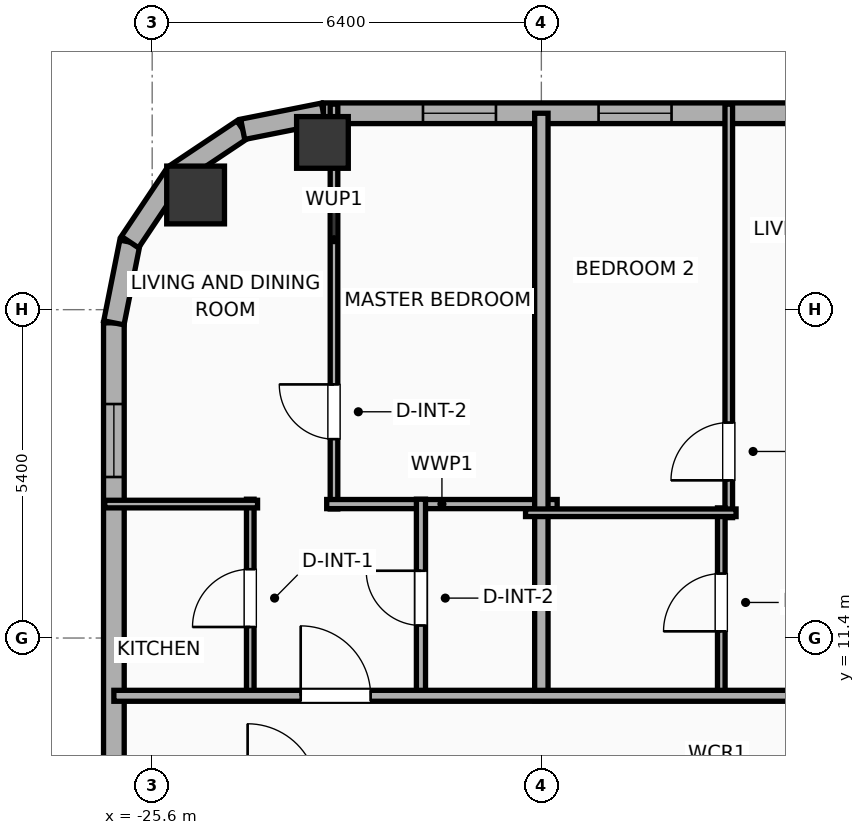
"""IFC4 building model, lengths in metres.
Left out: names, types, materials, properties, quantities, classifications, styles, units other than length and angle.
Written with IfcOpenShell. Run it as: python <this file> out.ifc"""

import sys

from ifc_helpers import new_model, si_unit, direction, frame, frame_2d, origin, origin_2d, place, context, subcontext, project, spatial, rectangle, hollow_rectangle, hollow_circle, extrude, element, fill, save


model = new_model("IFC4")
c1 = context("Model", 3, precision=1e-05, world=origin(), true_north=direction((0.0, 1.0)))
c2 = subcontext(c1, "Body", "Model", "MODEL_VIEW")
j1 = project(units=[si_unit("LENGTHUNIT", "METRE"), si_unit("PLANEANGLEUNIT", "RADIAN")], contexts=[c1])
p1 = place(None, origin())
s1 = spatial("IfcSite", under=j1, at=p1, CompositionType="ELEMENT")
p2 = place(p1, origin())
s2 = spatial("IfcBuilding", under=s1, at=p2, CompositionType="ELEMENT")
p3 = place(p2, frame((0.0, 0.0, 250.9)))
s3 = spatial("IfcBuildingStorey", under=s2, at=p3, CompositionType="ELEMENT", Elevation=250.9)
p4 = place(p3, frame((-22.8, 19.55, 0.0), z_axis=(0.0, 0.0, 1.0), x_axis=(1.0, 0.0, 0.0)))
e1 = element("IfcColumn", 1, at=p4, inside=s3, PredefinedType="COLUMN", context=c2, shape_type="SweptSolid", body=[
    extrude(hollow_rectangle(XDim=0.85, YDim=0.85, WallThickness=0.028, at=origin_2d()), origin(), (0.0, 0.0, 1.0), 3.865),
])
p5 = place(p3, frame((-24.886, 18.686, 0.0), z_axis=(0.0, 0.0, 1.0), x_axis=(1.0, 0.0, 0.0)))
e2 = element("IfcColumn", 2, at=p5, inside=s3, PredefinedType="COLUMN", context=c2, shape_type="SweptSolid", body=[
    extrude(hollow_circle(Radius=0.475, WallThickness=0.032, at=origin_2d()), origin(), (0.0, 0.0, 1.0), 3.865),
])
p6 = place(p3, frame((-26.23, -15.383, 0.0), z_axis=(0.0, 0.0, 1.0), x_axis=(0.0, 1.0, 0.0)))
e3 = element("IfcWall", 3, at=p6, inside=s3, PredefinedType="ELEMENTEDWALL", context=c2, shape_type="SweptSolid", body=[
    extrude(rectangle(XDim=31.967, YDim=0.34, at=frame_2d((15.983, 0.0))), origin(), (0.0, 0.0, 1.0), 2.39),
])
p7 = place(p6, frame((29.431, 0.0, 0.55)))
e4 = element("IfcOpeningElement", 4, at=p7, cuts=e3, PredefinedType="OPENING", context=c2, shape_type="SweptSolid", body=[
    extrude(rectangle(XDim=1.2, YDim=1.15, at=frame_2d((0.6, 0.575))), frame((0.0, 0.18, 0.0), z_axis=(0.0, -1.0, 0.0), x_axis=(1.0, 0.0, 0.0)), (0.0, 0.0, 1.0), 0.36),
])
p8 = place(p6, frame((20.603, 0.0, 0.55)))
e5 = element("IfcOpeningElement", 5, at=p8, cuts=e3, PredefinedType="OPENING", context=c2, shape_type="SweptSolid", body=[
    extrude(rectangle(XDim=1.2, YDim=1.15, at=frame_2d((0.6, 0.575))), frame((0.0, 0.18, 0.0), z_axis=(0.0, -1.0, 0.0), x_axis=(1.0, 0.0, 0.0)), (0.0, 0.0, 1.0), 0.36),
])
p9 = place(p6, frame((7.258, 0.0, 0.55)))
e6 = element("IfcOpeningElement", 6, at=p9, cuts=e3, PredefinedType="OPENING", context=c2, shape_type="SweptSolid", body=[
    extrude(rectangle(XDim=1.2, YDim=1.15, at=frame_2d((0.6, 0.575))), frame((0.0, 0.18, 0.0), z_axis=(0.0, -1.0, 0.0), x_axis=(1.0, 0.0, 0.0)), (0.0, 0.0, 1.0), 0.36),
])
p10 = place(p3, frame((-26.23, 16.583, 0.0), z_axis=(0.0, 0.0, 1.0), x_axis=(0.195075878998, 0.980788153188, 0.0)))
e7 = element("IfcWall", 7, at=p10, inside=s3, PredefinedType="ELEMENTEDWALL", context=c2, shape_type="SweptSolid", body=[
    extrude(rectangle(XDim=1.354, YDim=0.34, at=frame_2d((0.677, 0.0))), origin(), (0.0, 0.0, 1.0), 2.39),
])
p11 = place(p3, frame((-25.966, 17.911, 0.0), z_axis=(0.0, 0.0, 1.0), x_axis=(0.555669034571, 0.831403586725, 0.0)))
e8 = element("IfcWall", 8, at=p11, inside=s3, PredefinedType="ELEMENTEDWALL", context=c2, shape_type="SweptSolid", body=[
    extrude(rectangle(XDim=1.337, YDim=0.34, at=frame_2d((0.668, 0.0))), origin(), (0.0, 0.0, 1.0), 3.5),
])
p12 = place(p3, frame((-25.223, 19.023, 0.0), z_axis=(0.0, 0.0, 1.0), x_axis=(0.831403586725, 0.555669034571, 0.0)))
e9 = element("IfcWall", 9, at=p12, inside=s3, PredefinedType="ELEMENTEDWALL", context=c2, shape_type="SweptSolid", body=[
    extrude(rectangle(XDim=1.337, YDim=0.34, at=frame_2d((0.668, 0.0))), origin(), (0.0, 0.0, 1.0), 2.39),
])
p13 = place(p3, frame((-24.111, 19.766, 0.0), z_axis=(0.0, 0.0, 1.0), x_axis=(0.980788153188, 0.195075878998, 0.0)))
e10 = element("IfcWall", 10, at=p13, inside=s3, PredefinedType="ELEMENTEDWALL", context=c2, shape_type="SweptSolid", body=[
    extrude(rectangle(XDim=1.354, YDim=0.34, at=frame_2d((0.677, 0.0))), origin(), (0.0, 0.0, 1.0), 2.39),
])
p14 = place(p3, frame((-22.783, 20.03, 0.0), z_axis=(0.0, 0.0, 1.0), x_axis=(1.0, 0.0, 0.0)))
e11 = element("IfcWall", 11, at=p14, inside=s3, PredefinedType="ELEMENTEDWALL", context=c2, shape_type="SweptSolid", body=[
    extrude(rectangle(XDim=49.566, YDim=0.34, at=frame_2d((24.783, 0.0))), origin(), (0.0, 0.0, 1.0), 2.39),
])
p15 = place(p14, frame((25.233, 0.0, 0.75)))
e12 = element("IfcOpeningElement", 12, at=p15, cuts=e11, PredefinedType="OPENING", context=c2, shape_type="SweptSolid", body=[
    extrude(rectangle(XDim=2.4, YDim=1.45, at=frame_2d((1.2, 0.725))), frame((0.0, 0.18, 0.0), z_axis=(0.0, -1.0, 0.0), x_axis=(1.0, 0.0, 0.0)), (0.0, 0.0, 1.0), 0.36),
])
p16 = place(p14, frame((41.756, 0.0, 0.75)))
e13 = element("IfcOpeningElement", 13, at=p16, cuts=e11, PredefinedType="OPENING", context=c2, shape_type="SweptSolid", body=[
    extrude(rectangle(XDim=2.4, YDim=1.45, at=frame_2d((1.2, 0.725))), frame((0.0, 0.18, 0.0), z_axis=(0.0, -1.0, 0.0), x_axis=(1.0, 0.0, 0.0)), (0.0, 0.0, 1.0), 0.36),
])
p17 = place(p14, frame((1.637, 0.0, 0.55)))
e14 = element("IfcOpeningElement", 14, at=p17, cuts=e11, PredefinedType="OPENING", context=c2, shape_type="SweptSolid", body=[
    extrude(rectangle(XDim=1.2, YDim=1.15, at=frame_2d((0.6, 0.575))), frame((0.0, 0.18, 0.0), z_axis=(0.0, -1.0, 0.0), x_axis=(1.0, 0.0, 0.0)), (0.0, 0.0, 1.0), 0.36),
])
p18 = place(p14, frame((8.019, 0.0, 0.55)))
e15 = element("IfcOpeningElement", 15, at=p18, cuts=e11, PredefinedType="OPENING", context=c2, shape_type="SweptSolid", body=[
    extrude(rectangle(XDim=1.2, YDim=1.15, at=frame_2d((0.6, 0.575))), frame((0.0, 0.18, 0.0), z_axis=(0.0, -1.0, 0.0), x_axis=(1.0, 0.0, 0.0)), (0.0, 0.0, 1.0), 0.36),
])
p19 = place(p14, frame((4.524, 0.0, 0.55)))
e16 = element("IfcOpeningElement", 16, at=p19, cuts=e11, PredefinedType="OPENING", context=c2, shape_type="SweptSolid", body=[
    extrude(rectangle(XDim=1.2, YDim=1.15, at=frame_2d((0.6, 0.575))), frame((0.0, 0.18, 0.0), z_axis=(0.0, -1.0, 0.0), x_axis=(1.0, 0.0, 0.0)), (0.0, 0.0, 1.0), 0.36),
])
p20 = place(p14, frame((11.678, 0.0, 0.55)))
e17 = element("IfcOpeningElement", 17, at=p20, cuts=e11, PredefinedType="OPENING", context=c2, shape_type="SweptSolid", body=[
    extrude(rectangle(XDim=1.2, YDim=1.15, at=frame_2d((0.6, 0.575))), frame((0.0, 0.18, 0.0), z_axis=(0.0, -1.0, 0.0), x_axis=(1.0, 0.0, 0.0)), (0.0, 0.0, 1.0), 0.36),
])
p21 = place(p14, frame((17.993, 0.0, 0.55)))
e18 = element("IfcOpeningElement", 18, at=p21, cuts=e11, PredefinedType="OPENING", context=c2, shape_type="SweptSolid", body=[
    extrude(rectangle(XDim=1.2, YDim=1.15, at=frame_2d((0.6, 0.575))), frame((0.0, 0.18, 0.0), z_axis=(0.0, -1.0, 0.0), x_axis=(1.0, 0.0, 0.0)), (0.0, 0.0, 1.0), 0.36),
])
p22 = place(p14, frame((15.138, 0.0, 0.55)))
e19 = element("IfcOpeningElement", 19, at=p22, cuts=e11, PredefinedType="OPENING", context=c2, shape_type="SweptSolid", body=[
    extrude(rectangle(XDim=1.2, YDim=1.15, at=frame_2d((0.6, 0.575))), frame((0.0, 0.18, 0.0), z_axis=(0.0, -1.0, 0.0), x_axis=(1.0, 0.0, 0.0)), (0.0, 0.0, 1.0), 0.36),
])
p23 = place(p14, frame((22.278, 0.0, 0.55)))
e20 = element("IfcOpeningElement", 20, at=p23, cuts=e11, PredefinedType="OPENING", context=c2, shape_type="SweptSolid", body=[
    extrude(rectangle(XDim=1.2, YDim=1.15, at=frame_2d((0.6, 0.575))), frame((0.0, 0.18, 0.0), z_axis=(0.0, -1.0, 0.0), x_axis=(1.0, 0.0, 0.0)), (0.0, 0.0, 1.0), 0.36),
])
p24 = place(p14, frame((30.384, 0.0, 0.55)))
e21 = element("IfcOpeningElement", 21, at=p24, cuts=e11, PredefinedType="OPENING", context=c2, shape_type="SweptSolid", body=[
    extrude(rectangle(XDim=0.85, YDim=1.15, at=frame_2d((0.425, 0.575))), frame((0.0, 0.18, 0.0), z_axis=(0.0, -1.0, 0.0), x_axis=(1.0, 0.0, 0.0)), (0.0, 0.0, 1.0), 0.36),
])
p25 = place(p14, frame((32.603, 0.0, 0.55)))
e22 = element("IfcOpeningElement", 22, at=p25, cuts=e11, PredefinedType="OPENING", context=c2, shape_type="SweptSolid", body=[
    extrude(rectangle(XDim=1.2, YDim=1.15, at=frame_2d((0.6, 0.575))), frame((0.0, 0.18, 0.0), z_axis=(0.0, -1.0, 0.0), x_axis=(1.0, 0.0, 0.0)), (0.0, 0.0, 1.0), 0.36),
])
p26 = place(p14, frame((37.223, 0.0, 0.55)))
e23 = element("IfcOpeningElement", 23, at=p26, cuts=e11, PredefinedType="OPENING", context=c2, shape_type="SweptSolid", body=[
    extrude(rectangle(XDim=1.2, YDim=1.15, at=frame_2d((0.6, 0.575))), frame((0.0, 0.18, 0.0), z_axis=(0.0, -1.0, 0.0), x_axis=(1.0, 0.0, 0.0)), (0.0, 0.0, 1.0), 0.36),
])
p27 = place(p14, frame((45.099, 0.0, 0.55)))
e24 = element("IfcOpeningElement", 24, at=p27, cuts=e11, PredefinedType="OPENING", context=c2, shape_type="SweptSolid", body=[
    extrude(rectangle(XDim=1.2, YDim=1.15, at=frame_2d((0.6, 0.575))), frame((0.0, 0.18, 0.0), z_axis=(0.0, -1.0, 0.0), x_axis=(1.0, 0.0, 0.0)), (0.0, 0.0, 1.0), 0.36),
])
p28 = place(p14, frame((47.209, 0.0, 0.55)))
e25 = element("IfcOpeningElement", 25, at=p28, cuts=e11, PredefinedType="OPENING", context=c2, shape_type="SweptSolid", body=[
    extrude(rectangle(XDim=1.2, YDim=1.15, at=frame_2d((0.6, 0.575))), frame((0.0, 0.18, 0.0), z_axis=(0.0, -1.0, 0.0), x_axis=(1.0, 0.0, 0.0)), (0.0, 0.0, 1.0), 0.36),
])
p29 = place(p3, frame((-22.61, 13.523, 0.0), z_axis=(0.0, 0.0, 1.0), x_axis=(0.0, 1.0, 0.0)))
e26 = element("IfcWall", 26, at=p29, inside=s3, PredefinedType="PARTITIONING", context=c2, shape_type="SweptSolid", body=[
    extrude(rectangle(XDim=6.657, YDim=0.125, at=frame_2d((3.329, 0.0))), origin(), (0.0, 0.0, 1.0), 2.39),
])
p30 = place(p29, frame((1.148, 0.0, 0.0)))
e27 = element("IfcOpeningElement", 27, at=p30, cuts=e26, PredefinedType="OPENING", context=c2, shape_type="SweptSolid", body=[
    extrude(rectangle(XDim=0.9, YDim=2.05, at=frame_2d((0.45, 1.025))), frame((0.0, 0.073, 0.0), z_axis=(0.0, -1.0, 0.0), x_axis=(1.0, 0.0, 0.0)), (0.0, 0.0, 1.0), 0.145),
])
p31 = place(p3, frame((-22.73, 13.603, 0.0), z_axis=(0.0, 0.0, 1.0), x_axis=(1.0, 0.0, 0.0)))
e28 = element("IfcWall", 28, at=p31, inside=s3, PredefinedType="PLUMBINGWALL", context=c2, shape_type="SweptSolid", body=[
    extrude(rectangle(XDim=3.79, YDim=0.15, at=frame_2d((1.895, 0.0))), origin(), (0.0, 0.0, 1.0), 3.5),
])
p32 = place(p3, frame((-23.987, 10.43, 0.0), z_axis=(0.0, 0.0, 1.0), x_axis=(0.0, 1.0, 0.0)))
e29 = element("IfcWall", 29, at=p32, inside=s3, PredefinedType="PARTITIONING", context=c2, shape_type="SweptSolid", body=[
    extrude(rectangle(XDim=3.253, YDim=0.125, at=frame_2d((1.626, 0.0))), origin(), (0.0, 0.0, 1.0), 3.5),
])
p33 = place(p32, frame((1.152, 0.0, 0.0)))
e30 = element("IfcOpeningElement", 30, at=p33, cuts=e29, PredefinedType="OPENING", context=c2, shape_type="SweptSolid", body=[
    extrude(rectangle(XDim=0.95, YDim=2.05, at=frame_2d((0.475, 1.025))), frame((0.0, 0.073, 0.0), z_axis=(0.0, -1.0, 0.0), x_axis=(1.0, 0.0, 0.0)), (0.0, 0.0, 1.0), 0.145),
])
p34 = place(p3, frame((-26.38, 13.603, 0.0), z_axis=(0.0, 0.0, 1.0), x_axis=(1.0, 0.0, 0.0)))
e31 = element("IfcWall", 31, at=p34, inside=s3, PredefinedType="PARTITIONING", context=c2, shape_type="SweptSolid", body=[
    extrude(rectangle(XDim=2.513, YDim=0.125, at=frame_2d((1.256, 0.0))), origin(), (0.0, 0.0, 1.0), 3.5),
])
p35 = place(p3, frame((-21.18, 10.43, 0.0), z_axis=(0.0, 0.0, 1.0), x_axis=(0.0, 1.0, 0.0)))
e32 = element("IfcWall", 32, at=p35, inside=s3, PredefinedType="PLUMBINGWALL", context=c2, shape_type="SweptSolid", body=[
    extrude(rectangle(XDim=3.253, YDim=0.15, at=frame_2d((1.626, 0.0))), origin(), (0.0, 0.0, 1.0), 2.39),
])
p36 = place(p35, frame((1.177, 0.0, 0.0)))
e33 = element("IfcOpeningElement", 33, at=p36, cuts=e32, PredefinedType="OPENING", context=c2, shape_type="SweptSolid", body=[
    extrude(rectangle(XDim=0.9, YDim=2.05, at=frame_2d((0.45, 1.025))), frame((0.0, 0.085, 0.0), z_axis=(0.0, -1.0, 0.0), x_axis=(1.0, 0.0, 0.0)), (0.0, 0.0, 1.0), 0.17),
])
p37 = place(p3, frame((-19.2, 10.37, 0.0), z_axis=(0.0, 0.0, 1.0), x_axis=(0.0, 1.0, 0.0)))
e34 = element("IfcWall", 34, at=p37, inside=s3, PredefinedType="PARTITIONING", context=c2, shape_type="SweptSolid", body=[
    extrude(rectangle(XDim=9.66, YDim=0.22, at=frame_2d((4.83, 0.0))), origin(), (0.0, 0.0, 1.0), 3.5),
])
p38 = place(p3, frame((-16.118, 13.38, 0.0), z_axis=(0.0, 0.0, 1.0), x_axis=(0.0, 1.0, 0.0)))
e35 = element("IfcWall", 35, at=p38, inside=s3, PredefinedType="PARTITIONING", context=c2, shape_type="SweptSolid", body=[
    extrude(rectangle(XDim=6.8, YDim=0.125, at=frame_2d((3.4, 0.0))), origin(), (0.0, 0.0, 1.0), 3.5),
])
p39 = place(p38, frame((0.613, 0.0, 0.0)))
e36 = element("IfcOpeningElement", 36, at=p39, cuts=e35, PredefinedType="OPENING", context=c2, shape_type="SweptSolid", body=[
    extrude(rectangle(XDim=0.95, YDim=2.05, at=frame_2d((0.475, 1.025))), frame((0.0, 0.073, 0.0), z_axis=(0.0, -1.0, 0.0), x_axis=(1.0, 0.0, 0.0)), (0.0, 0.0, 1.0), 0.145),
])
p40 = place(p3, frame((-16.241, 10.43, 0.0), z_axis=(0.0, 0.0, 1.0), x_axis=(0.0, 1.0, 0.0)))
e37 = element("IfcWall", 37, at=p40, inside=s3, PredefinedType="PARTITIONING", context=c2, shape_type="SweptSolid", body=[
    extrude(rectangle(XDim=3.11, YDim=0.125, at=frame_2d((1.555, 0.0))), origin(), (0.0, 0.0, 1.0), 3.5),
])
p41 = place(p40, frame((1.08, 0.0, 0.0)))
e38 = element("IfcOpeningElement", 38, at=p41, cuts=e37, PredefinedType="OPENING", context=c2, shape_type="SweptSolid", body=[
    extrude(rectangle(XDim=0.95, YDim=2.05, at=frame_2d((0.475, 1.025))), frame((0.0, 0.073, 0.0), z_axis=(0.0, -1.0, 0.0), x_axis=(1.0, 0.0, 0.0)), (0.0, 0.0, 1.0), 0.145),
])
p42 = place(p3, frame((-19.46, 13.46, 0.0), z_axis=(0.0, 0.0, 1.0), x_axis=(1.0, 0.0, 0.0)))
e39 = element("IfcWall", 39, at=p42, inside=s3, PredefinedType="PARTITIONING", context=c2, shape_type="SweptSolid", body=[
    extrude(rectangle(XDim=3.462, YDim=0.125, at=frame_2d((1.731, 0.0))), origin(), (0.0, 0.0, 1.0), 3.5),
])
p43 = place(p3, frame((-26.23, 10.45, 0.0), z_axis=(0.0, 0.0, 1.0), x_axis=(1.0, 0.0, 0.0)))
e40 = element("IfcWall", 40, at=p43, inside=s3, PredefinedType="PARTITIONING", context=c2, shape_type="SweptSolid", body=[
    extrude(rectangle(XDim=56.46, YDim=0.18, at=frame_2d((28.23, 0.0))), origin(), (0.0, 0.0, 1.0), 3.5),
])
p44 = place(p43, frame((3.072, 0.0, 0.0)))
e41 = element("IfcOpeningElement", 41, at=p44, cuts=e40, PredefinedType="OPENING", context=c2, shape_type="SweptSolid", body=[
    extrude(rectangle(XDim=1.15, YDim=2.05, at=frame_2d((0.575, 1.025))), frame((0.0, 0.1, 0.0), z_axis=(0.0, -1.0, 0.0), x_axis=(1.0, 0.0, 0.0)), (0.0, 0.0, 1.0), 0.2),
])
p45 = place(p43, frame((12.146, 0.0, 0.0)))
e42 = element("IfcOpeningElement", 42, at=p45, cuts=e40, PredefinedType="OPENING", context=c2, shape_type="SweptSolid", body=[
    extrude(rectangle(XDim=1.15, YDim=2.05, at=frame_2d((0.575, 1.025))), frame((0.0, 0.1, 0.0), z_axis=(0.0, -1.0, 0.0), x_axis=(1.0, 0.0, 0.0)), (0.0, 0.0, 1.0), 0.2),
])
p46 = place(p43, frame((22.302, 0.0, 0.0)))
e43 = element("IfcOpeningElement", 43, at=p46, cuts=e40, PredefinedType="OPENING", context=c2, shape_type="SweptSolid", body=[
    extrude(rectangle(XDim=1.15, YDim=2.05, at=frame_2d((0.575, 1.025))), frame((0.0, 0.1, 0.0), z_axis=(0.0, -1.0, 0.0), x_axis=(1.0, 0.0, 0.0)), (0.0, 0.0, 1.0), 0.2),
])
p47 = place(p43, frame((32.601, 0.0, 0.0)))
e44 = element("IfcOpeningElement", 44, at=p47, cuts=e40, PredefinedType="OPENING", context=c2, shape_type="SweptSolid", body=[
    extrude(rectangle(XDim=1.15, YDim=2.05, at=frame_2d((0.575, 1.025))), frame((0.0, 0.1, 0.0), z_axis=(0.0, -1.0, 0.0), x_axis=(1.0, 0.0, 0.0)), (0.0, 0.0, 1.0), 0.2),
])
p48 = place(p43, frame((40.941, 0.0, 0.0)))
e45 = element("IfcOpeningElement", 45, at=p48, cuts=e40, PredefinedType="OPENING", context=c2, shape_type="SweptSolid", body=[
    extrude(rectangle(XDim=0.9, YDim=2.05, at=frame_2d((0.45, 1.025))), frame((0.0, 0.1, 0.0), z_axis=(0.0, -1.0, 0.0), x_axis=(1.0, 0.0, 0.0)), (0.0, 0.0, 1.0), 0.2),
])
p49 = place(p43, frame((45.559, 0.0, 0.0)))
e46 = element("IfcOpeningElement", 46, at=p49, cuts=e40, PredefinedType="OPENING", context=c2, shape_type="SweptSolid", body=[
    extrude(rectangle(XDim=1.15, YDim=2.05, at=frame_2d((0.575, 1.025))), frame((0.0, 0.1, 0.0), z_axis=(0.0, -1.0, 0.0), x_axis=(1.0, 0.0, 0.0)), (0.0, 0.0, 1.0), 0.2),
])
p50 = place(p43, frame((53.125, 0.0, 0.0)))
e47 = element("IfcOpeningElement", 47, at=p50, cuts=e40, PredefinedType="OPENING", context=c2, shape_type="SweptSolid", body=[
    extrude(rectangle(XDim=0.9, YDim=2.05, at=frame_2d((0.45, 1.025))), frame((0.0, 0.1, 0.0), z_axis=(0.0, -1.0, 0.0), x_axis=(1.0, 0.0, 0.0)), (0.0, 0.0, 1.0), 0.2),
])
p51 = place(p7, origin())
e48 = element("IfcWindow", 48, at=p51, inside=s3, PartitioningType="SINGLE_PANEL", PredefinedType="WINDOW", context=c2, shape_type="SweptSolid", body=[
    extrude(rectangle(XDim=1.2, YDim=1.15, at=frame_2d((0.6, 0.575))), frame((0.0, 0.03, 0.0), z_axis=(0.0, -1.0, 0.0), x_axis=(1.0, 0.0, 0.0)), (0.0, 0.0, 1.0), 0.06),
])
fill(e4, e48)
p52 = place(p17, origin())
e49 = element("IfcWindow", 49, at=p52, inside=s3, PartitioningType="SINGLE_PANEL", PredefinedType="WINDOW", context=c2, shape_type="SweptSolid", body=[
    extrude(rectangle(XDim=1.2, YDim=1.15, at=frame_2d((0.6, 0.575))), frame((0.0, 0.03, 0.0), z_axis=(0.0, -1.0, 0.0), x_axis=(1.0, 0.0, 0.0)), (0.0, 0.0, 1.0), 0.06),
])
fill(e14, e49)
p53 = place(p19, origin())
e50 = element("IfcWindow", 50, at=p53, inside=s3, PartitioningType="SINGLE_PANEL", PredefinedType="WINDOW", context=c2, shape_type="SweptSolid", body=[
    extrude(rectangle(XDim=1.2, YDim=1.15, at=frame_2d((0.6, 0.575))), frame((0.0, 0.03, 0.0), z_axis=(0.0, -1.0, 0.0), x_axis=(1.0, 0.0, 0.0)), (0.0, 0.0, 1.0), 0.06),
])
fill(e16, e50)
p54 = place(p30, origin())
e51 = element("IfcDoor", 51, at=p54, inside=s3, OperationType="SINGLE_SWING_RIGHT", PredefinedType="DOOR", context=c2, shape_type="SweptSolid", body=[
    extrude(rectangle(XDim=0.9, YDim=2.05, at=frame_2d((0.45, 1.025))), frame((0.0, 0.025, 0.0), z_axis=(0.0, -1.0, 0.0), x_axis=(1.0, 0.0, 0.0)), (0.0, 0.0, 1.0), 0.05),
])
fill(e27, e51)
p55 = place(p33, origin())
e52 = element("IfcDoor", 52, at=p55, inside=s3, OperationType="SINGLE_SWING_LEFT", PredefinedType="DOOR", context=c2, shape_type="SweptSolid", body=[
    extrude(rectangle(XDim=0.95, YDim=2.05, at=frame_2d((0.475, 1.025))), frame((0.0, 0.025, 0.0), z_axis=(0.0, -1.0, 0.0), x_axis=(1.0, 0.0, 0.0)), (0.0, 0.0, 1.0), 0.05),
])
fill(e30, e52)
p56 = place(p36, origin())
e53 = element("IfcDoor", 53, at=p56, inside=s3, OperationType="SINGLE_SWING_RIGHT", PredefinedType="DOOR", context=c2, shape_type="SweptSolid", body=[
    extrude(rectangle(XDim=0.9, YDim=2.05, at=frame_2d((0.45, 1.025))), frame((0.0, 0.025, 0.0), z_axis=(0.0, -1.0, 0.0), x_axis=(1.0, 0.0, 0.0)), (0.0, 0.0, 1.0), 0.05),
])
fill(e33, e53)
p57 = place(p39, origin())
e54 = element("IfcDoor", 54, at=p57, inside=s3, OperationType="SINGLE_SWING_LEFT", PredefinedType="DOOR", context=c2, shape_type="SweptSolid", body=[
    extrude(rectangle(XDim=0.95, YDim=2.05, at=frame_2d((0.475, 1.025))), frame((0.0, 0.025, 0.0), z_axis=(0.0, -1.0, 0.0), x_axis=(1.0, 0.0, 0.0)), (0.0, 0.0, 1.0), 0.05),
])
fill(e36, e54)
p58 = place(p41, origin())
e55 = element("IfcDoor", 55, at=p58, inside=s3, OperationType="SINGLE_SWING_LEFT", PredefinedType="DOOR", context=c2, shape_type="SweptSolid", body=[
    extrude(rectangle(XDim=0.95, YDim=2.05, at=frame_2d((0.475, 1.025))), frame((0.0, 0.025, 0.0), z_axis=(0.0, -1.0, 0.0), x_axis=(1.0, 0.0, 0.0)), (0.0, 0.0, 1.0), 0.05),
])
fill(e38, e55)
p59 = place(p44, origin())
e56 = element("IfcDoor", 56, at=p59, inside=s3, OperationType="SINGLE_SWING_LEFT", PredefinedType="DOOR", context=c2, shape_type="SweptSolid", body=[
    extrude(rectangle(XDim=1.15, YDim=2.05, at=frame_2d((0.575, 1.025))), frame((0.0, 0.025, 0.0), z_axis=(0.0, -1.0, 0.0), x_axis=(1.0, 0.0, 0.0)), (0.0, 0.0, 1.0), 0.05),
])
fill(e41, e56)
save(model, sys.argv[1])
